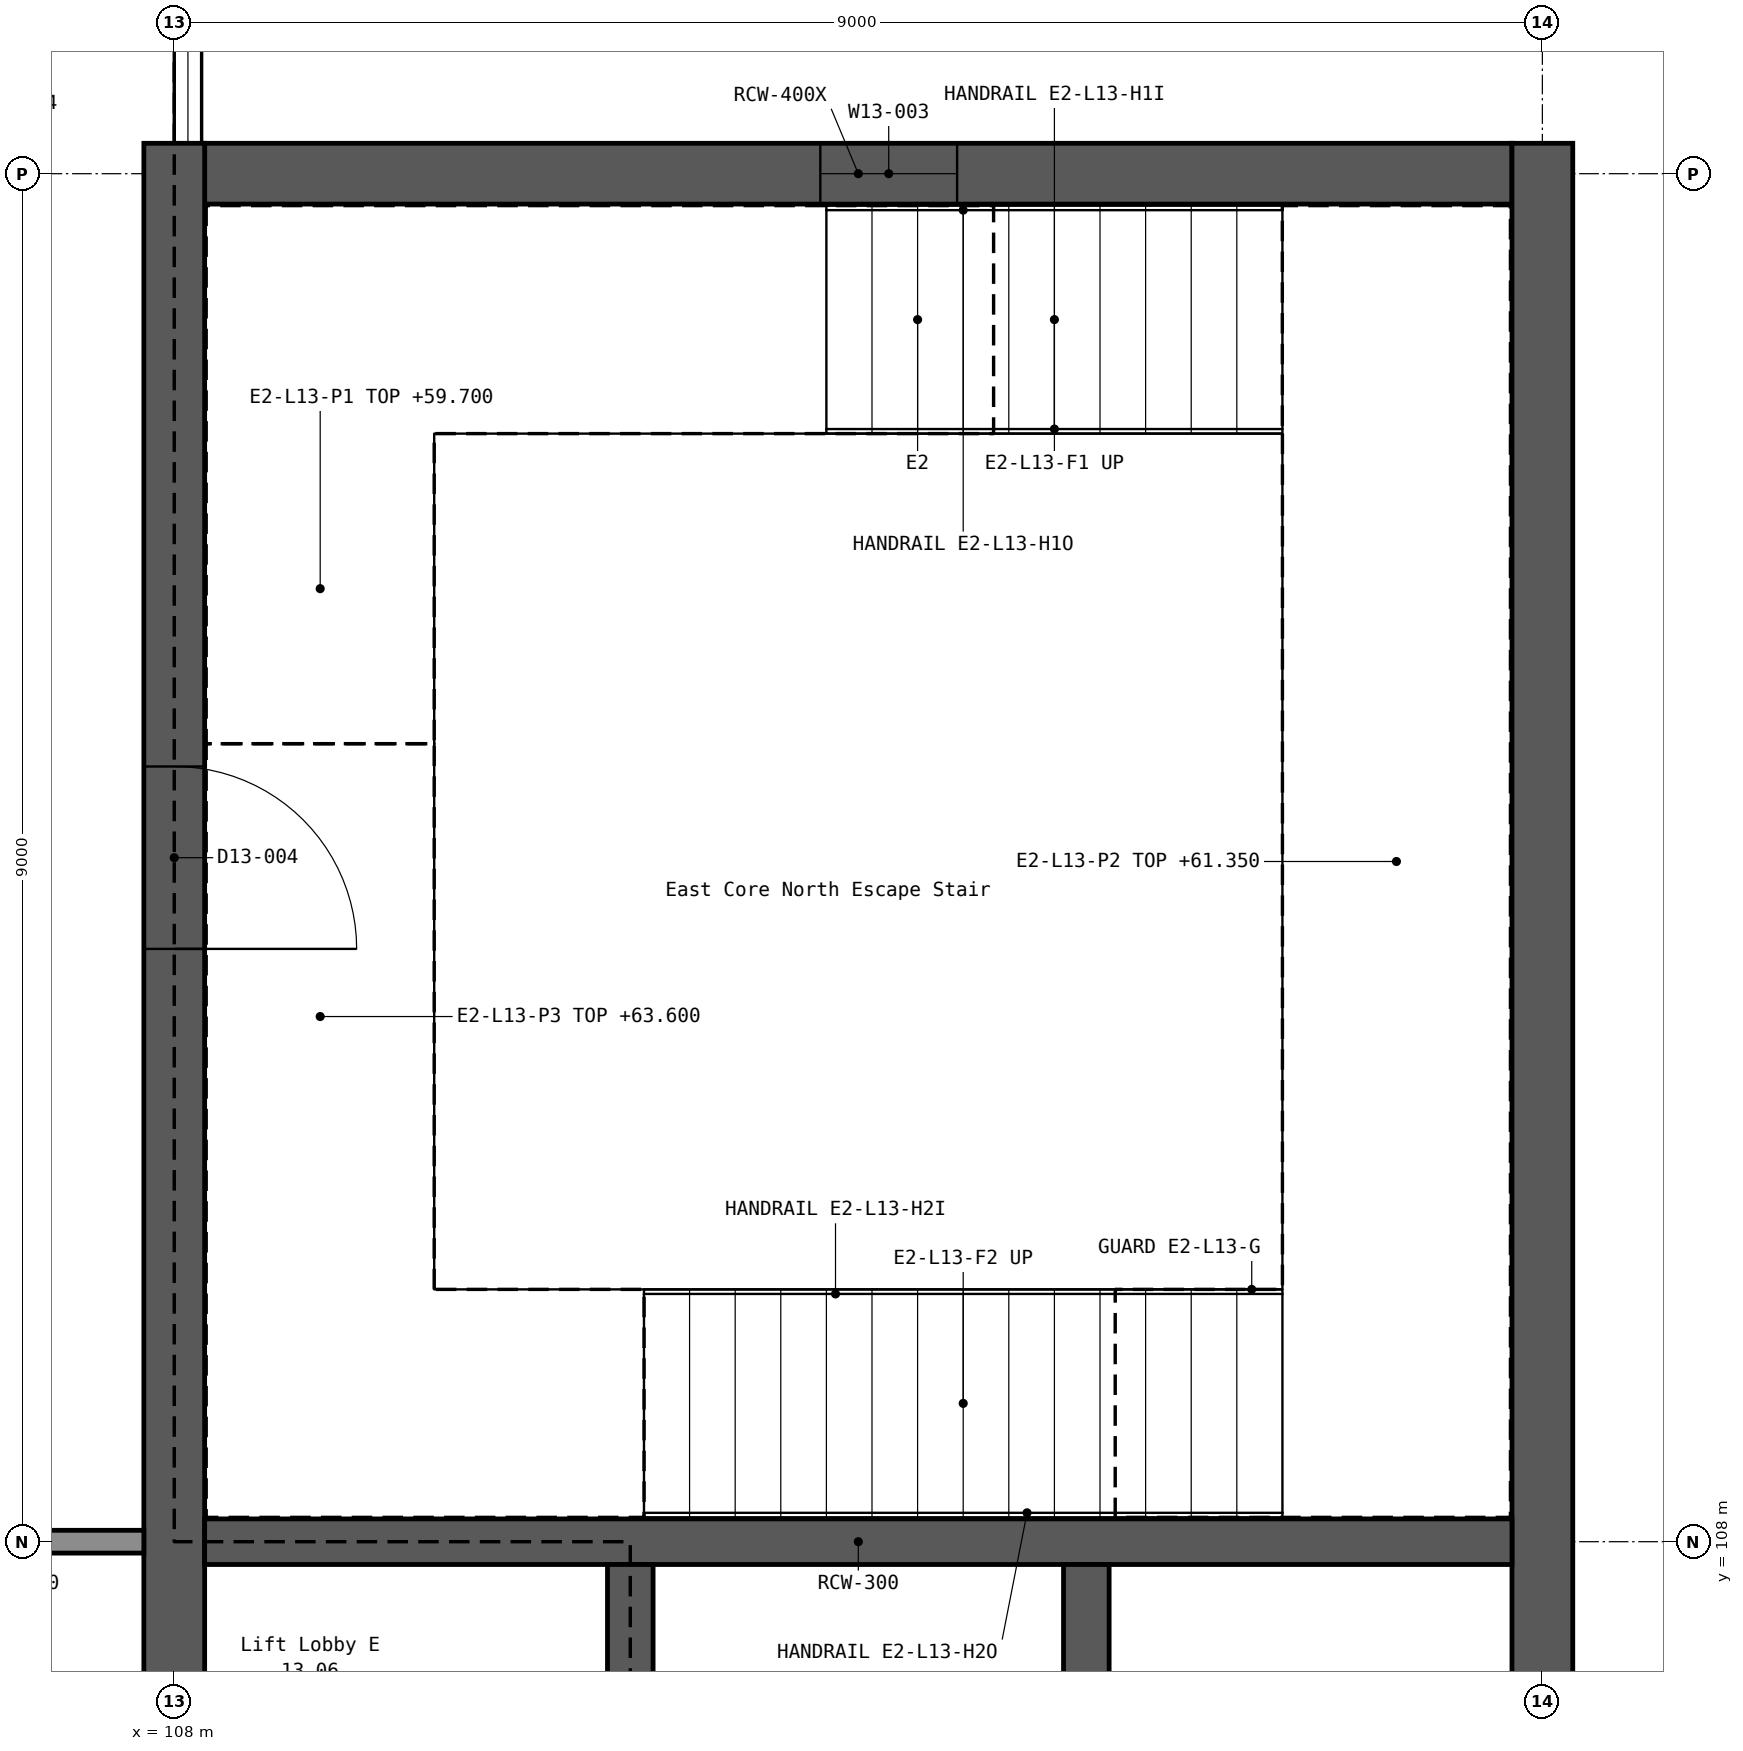
"""IFC4 building model, lengths in metres.
Left out: names, types, materials, properties, quantities, classifications, styles, units other than length and angle.
Written with IfcOpenShell. Run it as: python <this file> out.ifc"""

import sys

from ifc_helpers import new_model, si_unit, direction, frame, frame_2d, origin, place, context, subcontext, project, spatial, rectangle, extrude, element, fill, save


model = new_model("IFC4")
c1 = context("Model", 3, precision=1e-05, world=origin(), true_north=direction((0.0, 1.0)))
c2 = subcontext(c1, "Body", "Model", "MODEL_VIEW")
j1 = project(units=[si_unit("LENGTHUNIT", "METRE"), si_unit("PLANEANGLEUNIT", "RADIAN")], contexts=[c1])
p1 = place(None, origin())
s1 = spatial("IfcSite", under=j1, at=p1, CompositionType="ELEMENT")
p2 = place(p1, origin())
s2 = spatial("IfcBuilding", under=s1, at=p2, CompositionType="ELEMENT")
p3 = place(p2, frame((0.0, 0.0, 59.7)))
s3 = spatial("IfcBuildingStorey", under=s2, at=p3, CompositionType="ELEMENT", Elevation=59.7)
p4 = place(p3, frame((108.2, 117.0, 0.0), z_axis=(0.0, 0.0, 1.0), x_axis=(1.0, 0.0, 0.0)))
e1 = element("IfcWall", 1, at=p4, inside=s3, PredefinedType="SHEAR", context=c2, shape_type="SweptSolid", body=[
    extrude(rectangle(XDim=8.6, YDim=0.4, at=frame_2d((4.3, 0.0))), origin(), (0.0, 0.0, 1.0), 3.9),
])
p5 = place(p4, frame((4.05, 0.0, 1.2)))
e2 = element("IfcOpeningElement", 2, at=p5, cuts=e1, PredefinedType="OPENING", context=c2, shape_type="SweptSolid", body=[
    extrude(rectangle(XDim=0.9, YDim=1.5, at=frame_2d((0.45, 0.75))), frame((0.0, 0.211, 0.0), z_axis=(0.0, -1.0, 0.0), x_axis=(1.0, 0.0, 0.0)), (0.0, 0.0, 1.0), 0.422),
])
p6 = place(p3, frame((108.0, 89.8, 0.0), z_axis=(0.0, 0.0, 1.0), x_axis=(0.0, 1.0, 0.0)))
e3 = element("IfcWall", 3, at=p6, inside=s3, PredefinedType="SHEAR", context=c2, shape_type="SweptSolid", body=[
    extrude(rectangle(XDim=27.4, YDim=0.4, at=frame_2d((13.7, 0.0))), origin(), (0.0, 0.0, 1.0), 3.9),
])
p7 = place(p6, frame((4.1, 0.0, 0.0)))
e4 = element("IfcOpeningElement", 4, at=p7, cuts=e3, PredefinedType="OPENING", context=c2, shape_type="SweptSolid", body=[
    extrude(rectangle(XDim=1.2, YDim=2.1, at=frame_2d((0.6, 1.05))), frame((0.0, 0.211, 0.0), z_axis=(0.0, -1.0, 0.0), x_axis=(1.0, 0.0, 0.0)), (0.0, 0.0, 1.0), 0.422),
])
p8 = place(p6, frame((22.1, 0.0, 0.0)))
e5 = element("IfcOpeningElement", 5, at=p8, cuts=e3, PredefinedType="OPENING", context=c2, shape_type="SweptSolid", body=[
    extrude(rectangle(XDim=1.2, YDim=2.1, at=frame_2d((0.6, 1.05))), frame((0.0, 0.211, 0.0), z_axis=(0.0, -1.0, 0.0), x_axis=(1.0, 0.0, 0.0)), (0.0, 0.0, 1.0), 0.422),
])
p9 = place(p6, frame((12.5, 0.0, 0.0)))
e6 = element("IfcOpeningElement", 6, at=p9, cuts=e3, PredefinedType="OPENING", context=c2, shape_type="SweptSolid", body=[
    extrude(rectangle(XDim=2.0, YDim=2.1, at=frame_2d((1.0, 1.05))), frame((0.0, 0.211, 0.0), z_axis=(0.0, -1.0, 0.0), x_axis=(1.0, 0.0, 0.0)), (0.0, 0.0, 1.0), 0.422),
])
p10 = place(p3, frame((117.0, 89.8, 0.0), z_axis=(0.0, 0.0, 1.0), x_axis=(0.0, 1.0, 0.0)))
e7 = element("IfcWall", 7, at=p10, inside=s3, PredefinedType="SHEAR", context=c2, shape_type="SweptSolid", body=[
    extrude(rectangle(XDim=27.4, YDim=0.4, at=frame_2d((13.7, 0.0))), origin(), (0.0, 0.0, 1.0), 3.9),
])
p11 = place(p3, frame((108.2, 108.0, 0.0), z_axis=(0.0, 0.0, 1.0), x_axis=(1.0, 0.0, 0.0)))
e8 = element("IfcWall", 8, at=p11, inside=s3, PredefinedType="SHEAR", context=c2, shape_type="SweptSolid", body=[
    extrude(rectangle(XDim=8.6, YDim=0.3, at=frame_2d((4.3, 0.0))), origin(), (0.0, 0.0, 1.0), 3.9),
])
p12 = place(p3, frame((111.0, 99.15, 0.0), z_axis=(0.0, 0.0, 1.0), x_axis=(0.0, 1.0, 0.0)))
e9 = element("IfcWall", 9, at=p12, inside=s3, PredefinedType="SHEAR", context=c2, shape_type="SweptSolid", body=[
    extrude(rectangle(XDim=8.7, YDim=0.3, at=frame_2d((4.35, 0.0))), origin(), (0.0, 0.0, 1.0), 3.9),
])
p13 = place(p12, frame((0.8, 0.0, 0.0)))
e10 = element("IfcOpeningElement", 10, at=p13, cuts=e9, PredefinedType="OPENING", context=c2, shape_type="SweptSolid", body=[
    extrude(rectangle(XDim=1.1, YDim=2.1, at=frame_2d((0.55, 1.05))), frame((0.0, 0.161, 0.0), z_axis=(0.0, -1.0, 0.0), x_axis=(1.0, 0.0, 0.0)), (0.0, 0.0, 1.0), 0.322),
])
p14 = place(p12, frame((3.8, 0.0, 0.0)))
e11 = element("IfcOpeningElement", 11, at=p14, cuts=e9, PredefinedType="OPENING", context=c2, shape_type="SweptSolid", body=[
    extrude(rectangle(XDim=1.1, YDim=2.1, at=frame_2d((0.55, 1.05))), frame((0.0, 0.161, 0.0), z_axis=(0.0, -1.0, 0.0), x_axis=(1.0, 0.0, 0.0)), (0.0, 0.0, 1.0), 0.322),
])
p15 = place(p12, frame((6.8, 0.0, 0.0)))
e12 = element("IfcOpeningElement", 12, at=p15, cuts=e9, PredefinedType="OPENING", context=c2, shape_type="SweptSolid", body=[
    extrude(rectangle(XDim=1.1, YDim=2.1, at=frame_2d((0.55, 1.05))), frame((0.0, 0.161, 0.0), z_axis=(0.0, -1.0, 0.0), x_axis=(1.0, 0.0, 0.0)), (0.0, 0.0, 1.0), 0.322),
])
p16 = place(p3, frame((114.0, 99.15, 0.0), z_axis=(0.0, 0.0, 1.0), x_axis=(0.0, 1.0, 0.0)))
e13 = element("IfcWall", 13, at=p16, inside=s3, PredefinedType="SHEAR", context=c2, shape_type="SweptSolid", body=[
    extrude(rectangle(XDim=8.7, YDim=0.3, at=frame_2d((4.35, 0.0))), origin(), (0.0, 0.0, 1.0), 3.9),
])
p17 = place(p3, frame((105.0, 108.0, 0.0), z_axis=(0.0, 0.0, 1.0), x_axis=(1.0, 0.0, 0.0)))
e14 = element("IfcWall", 14, at=p17, inside=s3, PredefinedType="PARTITIONING", context=c2, shape_type="SweptSolid", body=[
    extrude(rectangle(XDim=2.8, YDim=0.15, at=frame_2d((1.4, 0.0))), origin(), (0.0, 0.0, 1.0), 3.27),
])
p18 = place(p17, frame((0.9, 0.0, 0.0)))
e15 = element("IfcOpeningElement", 15, at=p18, cuts=e14, PredefinedType="OPENING", context=c2, shape_type="SweptSolid", body=[
    extrude(rectangle(XDim=1.2, YDim=2.1, at=frame_2d((0.6, 1.05))), frame((0.0, 0.086, 0.0), z_axis=(0.0, -1.0, 0.0), x_axis=(1.0, 0.0, 0.0)), (0.0, 0.0, 1.0), 0.172),
])
p19 = place(p5, origin())
e16 = element("IfcWindow", 16, at=p19, inside=s3, PartitioningType="SINGLE_PANEL", PredefinedType="WINDOW", context=c2, shape_type="SweptSolid", body=[
    extrude(rectangle(XDim=0.9, YDim=1.5, at=frame_2d((0.45, 0.75))), frame((0.0, 0.03, 0.0), z_axis=(0.0, -1.0, 0.0), x_axis=(1.0, 0.0, 0.0)), (0.0, 0.0, 1.0), 0.06),
])
fill(e2, e16)
p20 = place(p8, frame((1.2, 0.0, 0.0), z_axis=(0.0, 0.0, 1.0), x_axis=(-1.0, 0.0, 0.0)))
e17 = element("IfcDoor", 17, at=p20, inside=s3, OperationType="SINGLE_SWING_RIGHT", PredefinedType="DOOR", context=c2, shape_type="SweptSolid", body=[
    extrude(rectangle(XDim=1.2, YDim=2.1, at=frame_2d((0.6, 1.05))), frame((0.0, 0.025, 0.0), z_axis=(0.0, -1.0, 0.0), x_axis=(1.0, 0.0, 0.0)), (0.0, 0.0, 1.0), 0.05),
])
fill(e5, e17)
save(model, sys.argv[1])
